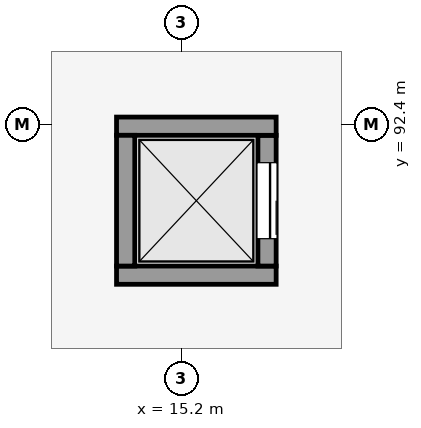
"""IFC4 building model, lengths in metres.
Left out: names, types, materials, properties, quantities, classifications, styles, units other than length and angle.
Written with IfcOpenShell. Run it as: python <this file> out.ifc"""

import sys

from ifc_helpers import new_model, si_unit, direction, frame, frame_2d, origin, place, context, subcontext, project, spatial, rectangle, extrude, element, fill, save


model = new_model("IFC4")
c1 = context("Model", 3, precision=1e-05, world=origin(), true_north=direction((0.0, 1.0)))
c2 = subcontext(c1, "Body", "Model", "MODEL_VIEW")
j1 = project(units=[si_unit("LENGTHUNIT", "METRE"), si_unit("PLANEANGLEUNIT", "RADIAN")], contexts=[c1])
p1 = place(None, origin())
s1 = spatial("IfcSite", under=j1, at=p1, CompositionType="ELEMENT")
p2 = place(p1, origin())
s2 = spatial("IfcBuilding", under=s1, at=p2, CompositionType="ELEMENT")
p3 = place(p2, origin())
s3 = spatial("IfcBuildingStorey", under=s2, at=p3, CompositionType="ELEMENT", Elevation=0.0)
p4 = place(p3, frame((15.515, 94.768, 0.0), z_axis=(0.0, 0.0, 1.0), x_axis=(0.967930025072, -0.251219956541, 0.0)))
e1 = element("IfcWall", 1, at=p4, inside=s3, PredefinedType="SHEAR", context=c2, shape_type="SweptSolid", body=[
    extrude(rectangle(XDim=6.31, YDim=0.38, at=frame_2d((3.155, 0.0))), origin(), (0.0, 0.0, 1.0), 4.8),
])
p5 = place(p3, frame((16.45, 90.42, 0.0), z_axis=(0.0, 0.0, 1.0), x_axis=(-1.0, 0.0, 0.0)))
e2 = element("IfcWall", 2, at=p5, inside=s3, PredefinedType="SHEAR", context=c2, shape_type="SweptSolid", body=[
    extrude(rectangle(XDim=2.1, YDim=0.24, at=frame_2d((1.05, 0.0))), origin(), (0.0, 0.0, 1.0), 5.1),
])
p6 = place(p3, frame((16.33, 92.26, 0.0), z_axis=(0.0, 0.0, 1.0), x_axis=(0.0, -1.0, 0.0)))
e3 = element("IfcWall", 3, at=p6, inside=s3, PredefinedType="SHEAR", context=c2, shape_type="SweptSolid", body=[
    extrude(rectangle(XDim=1.72, YDim=0.24, at=frame_2d((0.86, 0.0))), origin(), (0.0, 0.0, 1.0), 5.1),
])
p7 = place(p6, frame((0.36, 0.0, 0.0)))
e4 = element("IfcOpeningElement", 4, at=p7, cuts=e3, PredefinedType="OPENING", context=c2, shape_type="SweptSolid", body=[
    extrude(rectangle(XDim=1.0, YDim=2.15, at=frame_2d((0.5, 1.075))), frame((0.0, 0.13, 0.0), z_axis=(0.0, -1.0, 0.0), x_axis=(1.0, 0.0, 0.0)), (0.0, 0.0, 1.0), 0.26),
])
p8 = place(p3, frame((14.35, 92.38, 0.0), z_axis=(0.0, 0.0, 1.0), x_axis=(1.0, 0.0, 0.0)))
e5 = element("IfcWall", 5, at=p8, inside=s3, PredefinedType="SHEAR", context=c2, shape_type="SweptSolid", body=[
    extrude(rectangle(XDim=2.1, YDim=0.24, at=frame_2d((1.05, 0.0))), origin(), (0.0, 0.0, 1.0), 5.1),
])
p9 = place(p3, frame((14.47, 90.54, 0.0), z_axis=(0.0, 0.0, 1.0), x_axis=(0.0, 1.0, 0.0)))
e6 = element("IfcWall", 6, at=p9, inside=s3, PredefinedType="SHEAR", context=c2, shape_type="SweptSolid", body=[
    extrude(rectangle(XDim=1.72, YDim=0.24, at=frame_2d((0.86, 0.0))), origin(), (0.0, 0.0, 1.0), 5.1),
])
p10 = place(p7, origin())
e7 = element("IfcDoor", 7, at=p10, inside=s3, OperationType="SLIDING_TO_RIGHT", PredefinedType="DOOR", context=c2, shape_type="SweptSolid", body=[
    extrude(rectangle(XDim=1.0, YDim=2.15, at=frame_2d((0.5, 1.075))), frame((0.0, 0.025, 0.0), z_axis=(0.0, -1.0, 0.0), x_axis=(1.0, 0.0, 0.0)), (0.0, 0.0, 1.0), 0.05),
])
fill(e4, e7)
save(model, sys.argv[1])
